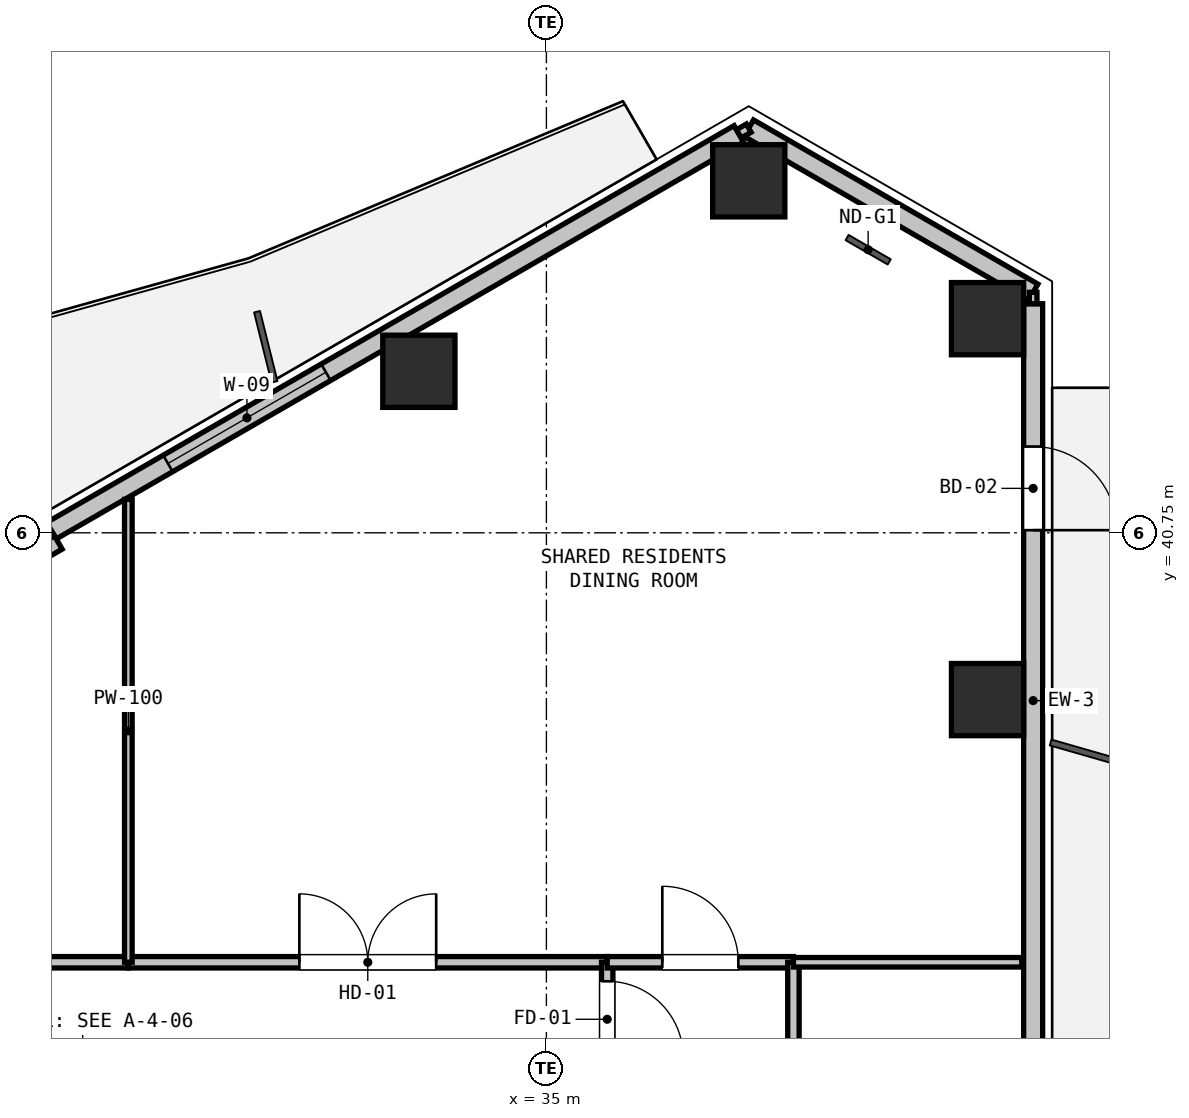
"""IFC4 building model, lengths in metres.
Left out: names, types, materials, properties, quantities, classifications, styles, units other than length and angle.
Written with IfcOpenShell. Run it as: python <this file> out.ifc"""

import sys

from ifc_helpers import new_model, si_unit, direction, frame, frame_2d, origin, origin_2d, place, context, subcontext, project, spatial, rectangle, hollow_rectangle, extrude, element, fill, save


model = new_model("IFC4")
c1 = context("Model", 3, precision=1e-05, world=origin(), true_north=direction((0.0, 1.0)))
c2 = subcontext(c1, "Body", "Model", "MODEL_VIEW")
j1 = project(units=[si_unit("LENGTHUNIT", "METRE"), si_unit("PLANEANGLEUNIT", "RADIAN")], contexts=[c1])
p1 = place(None, origin())
s1 = spatial("IfcSite", under=j1, at=p1, CompositionType="ELEMENT")
p2 = place(p1, origin())
s2 = spatial("IfcBuilding", under=s1, at=p2, CompositionType="ELEMENT")
p3 = place(p2, frame((0.0, 0.0, 170.7)))
s3 = spatial("IfcBuildingStorey", under=s2, at=p3, CompositionType="ELEMENT", Elevation=170.7)
for number, where, z_axis, x_axis in (
    (1, (33.322, 42.875, 0.0), (0.0, 0.0, 1.0), (1.0, 0.0, 0.0)),
    (2, (37.662, 45.381, 0.0), (0.0, 0.0, 1.0), (1.0, 0.0, 0.0)),
    (3, (40.804, 43.567, 0.0), (0.0, 0.0, 1.0), (1.0, 0.0, 0.0)),
    (4, (40.804, 38.556, 0.0), (0.0, 0.0, 1.0), (1.0, 0.0, 0.0)),
):
    element("IfcColumn", number, at=place(p3, frame(where, z_axis=z_axis, x_axis=x_axis)), inside=s3, PredefinedType="COLUMN", context=c2, shape_type="SweptSolid", body=[
        extrude(hollow_rectangle(XDim=0.95, YDim=0.95, WallThickness=0.028, at=origin_2d()), origin(), (0.0, 0.0, 1.0), 3.22),
    ])
p4 = place(p3, frame((37.662, 46.074, 0.0), z_axis=(0.0, 0.0, 1.0), x_axis=(0.866047252008, -0.499962155857, 0.0)))
e5 = element("IfcWall", 5, at=p4, inside=s3, PredefinedType="SOLIDWALL", context=c2, shape_type="SweptSolid", body=[
    extrude(rectangle(XDim=4.32, YDim=0.25, at=frame_2d((2.16, 0.0))), origin(), (0.0, 0.0, 1.0), 4.19),
])
p5 = place(p3, frame((28.489, 40.778, 0.0), z_axis=(0.0, 0.0, 1.0), x_axis=(0.866027516296, 0.499996341005, 0.0)))
e6 = element("IfcWall", 6, at=p5, inside=s3, PredefinedType="SOLIDWALL", context=c2, shape_type="SweptSolid", body=[
    extrude(rectangle(XDim=10.442, YDim=0.25, at=frame_2d((5.221, 0.0))), origin(), (0.0, 0.0, 1.0), 3.205),
])
p6 = place(p5, frame((1.769, 0.0, 0.9)))
e7 = element("IfcOpeningElement", 7, at=p6, cuts=e6, PredefinedType="OPENING", context=c2, shape_type="SweptSolid", body=[
    extrude(rectangle(XDim=2.4, YDim=2.2, at=frame_2d((1.2, 1.1))), frame((0.0, 0.135, 0.0), z_axis=(0.0, -1.0, 0.0), x_axis=(1.0, 0.0, 0.0)), (0.0, 0.0, 1.0), 0.27),
])
p7 = place(p3, frame((27.107, 39.772, 0.0), z_axis=(0.0, 0.0, 1.0), x_axis=(0.866087547558, 0.499892348375, 0.0)))
e8 = element("IfcWall", 8, at=p7, inside=s3, PredefinedType="PARAPET", context=c2, shape_type="SweptSolid", body=[
    extrude(rectangle(XDim=1.7, YDim=0.2, at=frame_2d((0.85, 0.0))), origin(), (0.0, 0.0, 1.0), 4.19),
])
p8 = place(p3, frame((41.404, 43.764, 0.0), z_axis=(0.0, 0.0, 1.0), x_axis=(0.0, -1.0, 0.0)))
e9 = element("IfcWall", 9, at=p8, inside=s3, PredefinedType="SOLIDWALL", context=c2, shape_type="SweptSolid", body=[
    extrude(rectangle(XDim=10.442, YDim=0.25, at=frame_2d((5.221, 0.0))), origin(), (0.0, 0.0, 1.0), 3.205),
])
p9 = place(p8, frame((1.879, 0.0, 0.0)))
e10 = element("IfcOpeningElement", 10, at=p9, cuts=e9, PredefinedType="OPENING", context=c2, shape_type="SweptSolid", body=[
    extrude(rectangle(XDim=1.1, YDim=2.1, at=frame_2d((0.55, 1.05))), frame((0.0, 0.135, 0.0), z_axis=(0.0, -1.0, 0.0), x_axis=(1.0, 0.0, 0.0)), (0.0, 0.0, 1.0), 0.27),
])
p10 = place(p3, frame((20.0, 35.1, 0.0), z_axis=(0.0, 0.0, 1.0), x_axis=(1.0, 0.0, 0.0)))
e11 = element("IfcWall", 11, at=p10, inside=s3, PredefinedType="PARTITIONING", context=c2, shape_type="SweptSolid", body=[
    extrude(rectangle(XDim=9.5, YDim=0.15, at=frame_2d((4.75, 0.0))), origin(), (0.0, 0.0, 1.0), 2.365),
])
p11 = place(p10, frame((3.85, 0.0, 0.0)))
e12 = element("IfcOpeningElement", 12, at=p11, cuts=e11, PredefinedType="OPENING", context=c2, shape_type="SweptSolid", body=[
    extrude(rectangle(XDim=1.8, YDim=2.2, at=frame_2d((0.9, 1.1))), frame((0.0, 0.085, 0.0), z_axis=(0.0, -1.0, 0.0), x_axis=(1.0, 0.0, 0.0)), (0.0, 0.0, 1.0), 0.17),
])
p12 = place(p3, frame((29.5, 35.1, 0.0), z_axis=(0.0, 0.0, 1.0), x_axis=(1.0, 0.0, 0.0)))
e13 = element("IfcWall", 13, at=p12, inside=s3, PredefinedType="PARTITIONING", context=c2, shape_type="SweptSolid", body=[
    extrude(rectangle(XDim=6.3, YDim=0.15, at=frame_2d((3.15, 0.0))), origin(), (0.0, 0.0, 1.0), 3.205),
])
p13 = place(p12, frame((2.25, 0.0, 0.0)))
e14 = element("IfcOpeningElement", 14, at=p13, cuts=e13, PredefinedType="OPENING", context=c2, shape_type="SweptSolid", body=[
    extrude(rectangle(XDim=1.8, YDim=2.2, at=frame_2d((0.9, 1.1))), frame((0.0, 0.085, 0.0), z_axis=(0.0, -1.0, 0.0), x_axis=(1.0, 0.0, 0.0)), (0.0, 0.0, 1.0), 0.17),
])
p14 = place(p3, frame((35.8, 35.1, 0.0), z_axis=(0.0, 0.0, 1.0), x_axis=(0.0, -1.0, 0.0)))
e15 = element("IfcWall", 15, at=p14, inside=s3, PredefinedType="PARTITIONING", context=c2, shape_type="SweptSolid", body=[
    extrude(rectangle(XDim=1.5, YDim=0.15, at=frame_2d((0.75, 0.0))), origin(), (0.0, 0.0, 1.0), 3.205),
])
p15 = place(p14, frame((0.25, 0.0, 0.0)))
e16 = element("IfcOpeningElement", 16, at=p15, cuts=e15, PredefinedType="OPENING", context=c2, shape_type="SweptSolid", body=[
    extrude(rectangle(XDim=1.0, YDim=2.15, at=frame_2d((0.5, 1.075))), frame((0.0, 0.085, 0.0), z_axis=(0.0, -1.0, 0.0), x_axis=(1.0, 0.0, 0.0)), (0.0, 0.0, 1.0), 0.17),
])
p16 = place(p3, frame((35.8, 35.1, 0.0), z_axis=(0.0, 0.0, 1.0), x_axis=(1.0, 0.0, 0.0)))
e17 = element("IfcWall", 17, at=p16, inside=s3, PredefinedType="PARTITIONING", context=c2, shape_type="SweptSolid", body=[
    extrude(rectangle(XDim=2.45, YDim=0.15, at=frame_2d((1.225, 0.0))), origin(), (0.0, 0.0, 1.0), 3.205),
])
p17 = place(p16, frame((0.725, 0.0, 0.0)))
e18 = element("IfcOpeningElement", 18, at=p17, cuts=e17, PredefinedType="OPENING", context=c2, shape_type="SweptSolid", body=[
    extrude(rectangle(XDim=1.0, YDim=2.15, at=frame_2d((0.5, 1.075))), frame((0.0, 0.085, 0.0), z_axis=(0.0, -1.0, 0.0), x_axis=(1.0, 0.0, 0.0)), (0.0, 0.0, 1.0), 0.17),
])
p18 = place(p3, frame((38.25, 35.1, 0.0), z_axis=(0.0, 0.0, 1.0), x_axis=(0.0, -1.0, 0.0)))
e19 = element("IfcWall", 19, at=p18, inside=s3, PredefinedType="PARTITIONING", context=c2, shape_type="SweptSolid", body=[
    extrude(rectangle(XDim=8.35, YDim=0.15, at=frame_2d((4.175, 0.0))), origin(), (0.0, 0.0, 1.0), 3.205),
])
p19 = place(p18, frame((3.675, 0.0, 0.0)))
e20 = element("IfcOpeningElement", 20, at=p19, cuts=e19, PredefinedType="OPENING", context=c2, shape_type="SweptSolid", body=[
    extrude(rectangle(XDim=1.0, YDim=2.15, at=frame_2d((0.5, 1.075))), frame((0.0, 0.085, 0.0), z_axis=(0.0, -1.0, 0.0), x_axis=(1.0, 0.0, 0.0)), (0.0, 0.0, 1.0), 0.17),
])
p20 = place(p3, frame((38.25, 35.1, 0.0), z_axis=(0.0, 0.0, 1.0), x_axis=(1.0, 0.0, 0.0)))
e21 = element("IfcWall", 21, at=p20, inside=s3, PredefinedType="PARTITIONING", context=c2, shape_type="SweptSolid", body=[
    extrude(rectangle(XDim=3.005, YDim=0.125, at=frame_2d((1.502, 0.0))), origin(), (0.0, 0.0, 1.0), 2.365),
])
p21 = place(p3, frame((29.5, 41.189, 0.0), z_axis=(0.0, 0.0, 1.0), x_axis=(0.0, -1.0, 0.0)))
e22 = element("IfcWall", 22, at=p21, inside=s3, PredefinedType="PARTITIONING", context=c2, shape_type="SweptSolid", body=[
    extrude(rectangle(XDim=6.089, YDim=0.1, at=frame_2d((3.044, 0.0))), origin(), (0.0, 0.0, 1.0), 2.365),
])
p22 = place(p3, frame((37.532, 45.999, 0.0), z_axis=(0.0, 0.0, 1.0), x_axis=(0.866131372301, 0.499816412211, 0.0)))
e23 = element("IfcWall", 23, at=p22, inside=s3, PredefinedType="PARTITIONING", context=c2, shape_type="SweptSolid", body=[
    extrude(rectangle(XDim=0.15, YDim=0.125, at=frame_2d((0.075, 0.0))), origin(), (0.0, 0.0, 1.0), 4.57),
])
p23 = place(p3, frame((41.404, 43.914, 0.0), z_axis=(0.0, 0.0, 1.0), x_axis=(0.0, -1.0, 0.0)))
e24 = element("IfcWall", 24, at=p23, inside=s3, PredefinedType="PARTITIONING", context=c2, shape_type="SweptSolid", body=[
    extrude(rectangle(XDim=0.15, YDim=0.1, at=frame_2d((0.075, 0.0))), origin(), (0.0, 0.0, 1.0), 4.57),
])
p24 = place(p6, origin())
e25 = element("IfcWindow", 25, at=p24, inside=s3, PartitioningType="SINGLE_PANEL", PredefinedType="WINDOW", context=c2, shape_type="SweptSolid", body=[
    extrude(rectangle(XDim=2.4, YDim=2.2, at=frame_2d((1.2, 1.1))), frame((0.0, 0.03, 0.0), z_axis=(0.0, -1.0, 0.0), x_axis=(1.0, 0.0, 0.0)), (0.0, 0.0, 1.0), 0.06),
])
fill(e7, e25)
p25 = place(p9, origin())
e26 = element("IfcDoor", 26, at=p25, inside=s3, OperationType="SINGLE_SWING_RIGHT", PredefinedType="DOOR", context=c2, shape_type="SweptSolid", body=[
    extrude(rectangle(XDim=1.1, YDim=2.1, at=frame_2d((0.55, 1.05))), frame((0.0, 0.025, 0.0), z_axis=(0.0, -1.0, 0.0), x_axis=(1.0, 0.0, 0.0)), (0.0, 0.0, 1.0), 0.05),
])
fill(e10, e26)
p26 = place(p15, origin())
e27 = element("IfcDoor", 27, at=p26, inside=s3, OperationType="SINGLE_SWING_RIGHT", PredefinedType="DOOR", context=c2, shape_type="SweptSolid", body=[
    extrude(rectangle(XDim=1.0, YDim=2.15, at=frame_2d((0.5, 1.075))), frame((0.0, 0.025, 0.0), z_axis=(0.0, -1.0, 0.0), x_axis=(1.0, 0.0, 0.0)), (0.0, 0.0, 1.0), 0.05),
])
fill(e16, e27)
p27 = place(p13, origin())
e28 = element("IfcDoor", 28, at=p27, inside=s3, OperationType="DOUBLE_DOOR_SINGLE_SWING", PredefinedType="DOOR", context=c2, shape_type="SweptSolid", body=[
    extrude(rectangle(XDim=1.8, YDim=2.2, at=frame_2d((0.9, 1.1))), frame((0.0, 0.025, 0.0), z_axis=(0.0, -1.0, 0.0), x_axis=(1.0, 0.0, 0.0)), (0.0, 0.0, 1.0), 0.05),
])
fill(e14, e28)
p28 = place(p17, origin())
e29 = element("IfcDoor", 29, at=p28, inside=s3, OperationType="SINGLE_SWING_LEFT", PredefinedType="DOOR", context=c2, shape_type="SweptSolid", body=[
    extrude(rectangle(XDim=1.0, YDim=2.15, at=frame_2d((0.5, 1.075))), frame((0.0, 0.025, 0.0), z_axis=(0.0, -1.0, 0.0), x_axis=(1.0, 0.0, 0.0)), (0.0, 0.0, 1.0), 0.05),
])
fill(e18, e29)
save(model, sys.argv[1])
